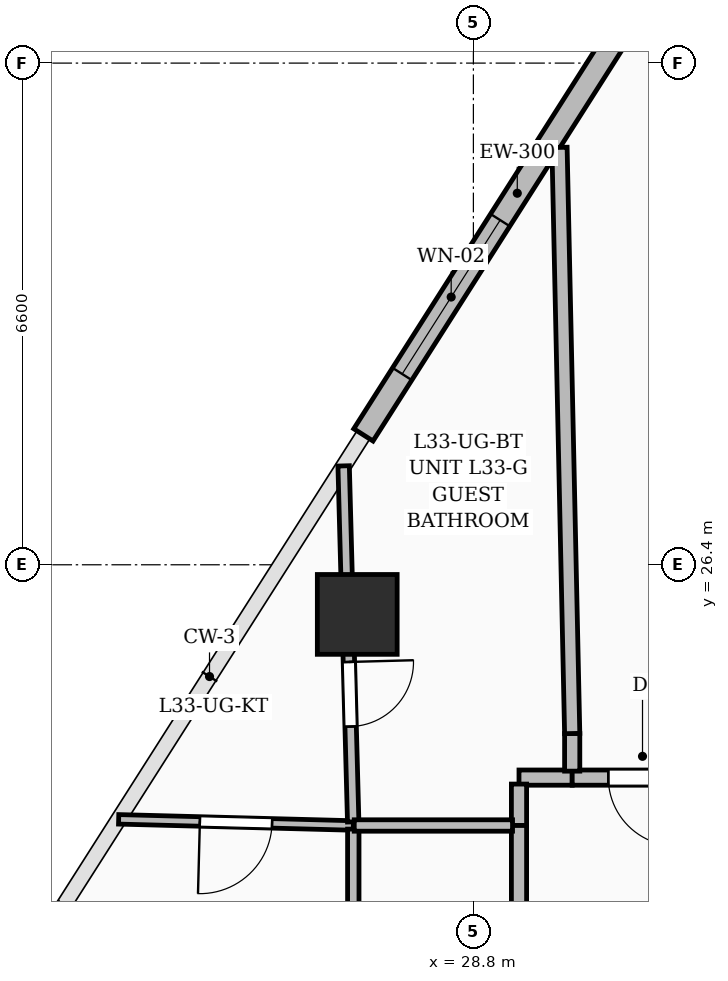
"""IFC4 building model, lengths in metres.
Left out: names, types, materials, properties, quantities, classifications, styles, units other than length and angle.
Written with IfcOpenShell. Run it as: python <this file> out.ifc"""

import sys

from ifc_helpers import new_model, si_unit, direction, frame, frame_2d, origin, origin_2d, place, context, subcontext, project, spatial, rectangle, extrude, element, fill, save


model = new_model("IFC4")
c1 = context("Model", 3, precision=1e-05, world=origin(), true_north=direction((0.0, 1.0)))
c2 = subcontext(c1, "Body", "Model", "MODEL_VIEW")
j1 = project(units=[si_unit("LENGTHUNIT", "METRE"), si_unit("PLANEANGLEUNIT", "RADIAN")], contexts=[c1])
p1 = place(None, origin())
s1 = spatial("IfcSite", under=j1, at=p1, CompositionType="ELEMENT")
p2 = place(p1, origin())
s2 = spatial("IfcBuilding", under=s1, at=p2, CompositionType="ELEMENT")
p3 = place(p2, frame((0.0, 0.0, 132.0)))
s3 = spatial("IfcBuildingStorey", under=s2, at=p3, CompositionType="ELEMENT", Elevation=132.0)
p4 = place(p3, frame((27.272, 25.747, 0.0), z_axis=(0.0, 0.0, 1.0), x_axis=(1.0, 0.0, 0.0)))
e1 = element("IfcColumn", 1, at=p4, inside=s3, PredefinedType="COLUMN", context=c2, shape_type="SweptSolid", body=[
    extrude(rectangle(XDim=1.05, YDim=1.05, at=origin_2d()), origin(), (0.0, 0.0, 1.0), 3.6),
])
p5 = place(p3, frame((27.353, 28.109, 0.0), z_axis=(0.0, 0.0, 1.0), x_axis=(0.537126938509, 0.843501423785, 0.0)))
e2 = element("IfcWall", 2, at=p5, inside=s3, PredefinedType="SOLIDWALL", context=c2, shape_type="SweptSolid", body=[
    extrude(rectangle(XDim=7.538, YDim=0.3, at=frame_2d((3.769, 0.0))), origin(), (0.0, 0.0, 1.0), 3.35),
])
p6 = place(p5, frame((0.95, 0.0, 0.6)))
e3 = element("IfcOpeningElement", 3, at=p6, cuts=e2, PredefinedType="OPENING", context=c2, shape_type="SweptSolid", body=[
    extrude(rectangle(XDim=2.4, YDim=2.1, at=frame_2d((1.2, 1.05))), frame((0.0, 0.16, 0.0), z_axis=(0.0, -1.0, 0.0), x_axis=(1.0, 0.0, 0.0)), (0.0, 0.0, 1.0), 0.32),
])
p7 = place(p3, frame((30.1, 23.6, 0.0), z_axis=(0.0, 0.0, 1.0), x_axis=(-1.0, 0.0, 0.0)))
e4 = element("IfcWall", 4, at=p7, inside=s3, PredefinedType="PARTITIONING", context=c2, shape_type="SweptSolid", body=[
    extrude(rectangle(XDim=0.7, YDim=0.2, at=frame_2d((0.35, 0.0))), origin(), (0.0, 0.0, 1.0), 2.372),
])
p8 = place(p3, frame((29.4, 23.515, 0.0), z_axis=(0.0, 0.0, 1.0), x_axis=(0.0, -1.0, 0.0)))
e5 = element("IfcWall", 5, at=p8, inside=s3, PredefinedType="PARTITIONING", context=c2, shape_type="SweptSolid", body=[
    extrude(rectangle(XDim=0.545, YDim=0.2, at=frame_2d((0.272, 0.0))), origin(), (0.0, 0.0, 1.0), 2.372),
])
p9 = place(p3, frame((29.4, 22.97, 0.0), z_axis=(0.0, 0.0, 1.0), x_axis=(0.0, -1.0, 0.0)))
e6 = element("IfcWall", 6, at=p9, inside=s3, PredefinedType="PARTITIONING", context=c2, shape_type="SweptSolid", body=[
    extrude(rectangle(XDim=5.22, YDim=0.2, at=frame_2d((2.61, 0.0))), origin(), (0.0, 0.0, 1.0), 3.01),
])
p10 = place(p3, frame((31.865, 23.6, 0.0), z_axis=(0.0, 0.0, 1.0), x_axis=(-1.0, 0.0, 0.0)))
e7 = element("IfcWall", 7, at=p10, inside=s3, PredefinedType="PARTITIONING", context=c2, shape_type="SweptSolid", body=[
    extrude(rectangle(XDim=1.765, YDim=0.2, at=frame_2d((0.882, 0.0))), origin(), (0.0, 0.0, 1.0), 3.01),
])
p11 = place(p10, frame((0.39, 0.0, 0.0)))
e8 = element("IfcOpeningElement", 8, at=p11, cuts=e7, PredefinedType="OPENING", context=c2, shape_type="SweptSolid", body=[
    extrude(rectangle(XDim=0.9, YDim=2.1, at=frame_2d((0.45, 1.05))), frame((0.0, 0.11, 0.0), z_axis=(0.0, -1.0, 0.0), x_axis=(1.0, 0.0, 0.0)), (0.0, 0.0, 1.0), 0.22),
])
p12 = place(p3, frame((27.22, 22.97, 0.0), z_axis=(0.0, 0.0, 1.0), x_axis=(-0.999655449648, 0.02624846641, 0.0)))
e9 = element("IfcWall", 9, at=p12, inside=s3, PredefinedType="PARTITIONING", context=c2, shape_type="SweptSolid", body=[
    extrude(rectangle(XDim=3.088, YDim=0.125, at=frame_2d((1.544, 0.0))), origin(), (0.0, 0.0, 1.0), 2.57),
])
p13 = place(p12, frame((1.069, 0.0, 0.0)))
e10 = element("IfcOpeningElement", 10, at=p13, cuts=e9, PredefinedType="OPENING", context=c2, shape_type="SweptSolid", body=[
    extrude(rectangle(XDim=0.95, YDim=2.2, at=frame_2d((0.475, 1.1))), frame((0.0, 0.072, 0.0), z_axis=(0.0, -1.0, 0.0), x_axis=(1.0, 0.0, 0.0)), (0.0, 0.0, 1.0), 0.145),
])
p14 = place(p3, frame((27.22, 17.835, 0.0), z_axis=(0.0, 0.0, 1.0), x_axis=(0.0, 1.0, 0.0)))
e11 = element("IfcWall", 11, at=p14, inside=s3, PredefinedType="PARTITIONING", context=c2, shape_type="SweptSolid", body=[
    extrude(rectangle(XDim=5.088, YDim=0.15, at=frame_2d((2.544, 0.0))), origin(), (0.0, 0.0, 1.0), 3.01),
])
p15 = place(p14, frame((2.075, 0.0, 0.0)))
e12 = element("IfcOpeningElement", 12, at=p15, cuts=e11, PredefinedType="OPENING", context=c2, shape_type="SweptSolid", body=[
    extrude(rectangle(XDim=0.9, YDim=2.15, at=frame_2d((0.45, 1.075))), frame((0.0, 0.085, 0.0), z_axis=(0.0, -1.0, 0.0), x_axis=(1.0, 0.0, 0.0)), (0.0, 0.0, 1.0), 0.17),
])
p16 = place(p3, frame((27.093, 27.701, 0.0), z_axis=(0.0, 0.0, 1.0), x_axis=(0.026837017595, -0.999639822379, 0.0)))
e13 = element("IfcWall", 13, at=p16, inside=s3, PredefinedType="PARTITIONING", context=c2, shape_type="SweptSolid", body=[
    extrude(rectangle(XDim=4.685, YDim=0.15, at=frame_2d((2.343, 0.0))), origin(), (0.0, 0.0, 1.0), 2.57),
])
p17 = place(p16, frame((2.581, 0.0, 0.0)))
e14 = element("IfcOpeningElement", 14, at=p17, cuts=e13, PredefinedType="OPENING", context=c2, shape_type="SweptSolid", body=[
    extrude(rectangle(XDim=0.85, YDim=2.1, at=frame_2d((0.425, 1.05))), frame((0.0, 0.085, 0.0), z_axis=(0.0, -1.0, 0.0), x_axis=(1.0, 0.0, 0.0)), (0.0, 0.0, 1.0), 0.17),
])
p18 = place(p3, frame((27.232, 22.97, 0.0), z_axis=(0.0, 0.0, 1.0), x_axis=(1.0, 0.0, 0.0)))
e15 = element("IfcWall", 15, at=p18, inside=s3, PredefinedType="PARTITIONING", context=c2, shape_type="SweptSolid", body=[
    extrude(rectangle(XDim=2.083, YDim=0.15, at=frame_2d((1.041, 0.0))), origin(), (0.0, 0.0, 1.0), 3.01),
])
p19 = place(p3, frame((30.1, 23.685, 0.0), z_axis=(0.0, 0.0, 1.0), x_axis=(0.0, 1.0, 0.0)))
e16 = element("IfcWall", 16, at=p19, inside=s3, PredefinedType="PARTITIONING", context=c2, shape_type="SweptSolid", body=[
    extrude(rectangle(XDim=0.495, YDim=0.2, at=frame_2d((0.248, 0.0))), origin(), (0.0, 0.0, 1.0), 3.35),
])
p20 = place(p3, frame((30.1, 24.18, 0.0), z_axis=(0.0, 0.0, 1.0), x_axis=(-0.021650773046, 0.99976559454, 0.0)))
e17 = element("IfcWall", 17, at=p20, inside=s3, PredefinedType="PARTITIONING", context=c2, shape_type="SweptSolid", body=[
    extrude(rectangle(XDim=7.713, YDim=0.2, at=frame_2d((3.856, 0.0))), origin(), (0.0, 0.0, 1.0), 2.57),
])
p21 = place(p6, origin())
e18 = element("IfcWindow", 18, at=p21, inside=s3, PartitioningType="SINGLE_PANEL", PredefinedType="WINDOW", context=c2, shape_type="SweptSolid", body=[
    extrude(rectangle(XDim=2.4, YDim=2.1, at=frame_2d((1.2, 1.05))), frame((0.0, 0.03, 0.0), z_axis=(0.0, -1.0, 0.0), x_axis=(1.0, 0.0, 0.0)), (0.0, 0.0, 1.0), 0.06),
])
fill(e3, e18)
p22 = place(p11, origin())
e19 = element("IfcDoor", 19, at=p22, inside=s3, OperationType="SINGLE_SWING_LEFT", PredefinedType="DOOR", context=c2, shape_type="SweptSolid", body=[
    extrude(rectangle(XDim=0.9, YDim=2.1, at=frame_2d((0.45, 1.05))), frame((0.0, 0.025, 0.0), z_axis=(0.0, -1.0, 0.0), x_axis=(1.0, 0.0, 0.0)), (0.0, 0.0, 1.0), 0.05),
])
fill(e8, e19)
p23 = place(p13, origin())
e20 = element("IfcDoor", 20, at=p23, inside=s3, OperationType="SINGLE_SWING_RIGHT", PredefinedType="DOOR", context=c2, shape_type="SweptSolid", body=[
    extrude(rectangle(XDim=0.95, YDim=2.2, at=frame_2d((0.475, 1.1))), frame((0.0, 0.025, 0.0), z_axis=(0.0, -1.0, 0.0), x_axis=(1.0, 0.0, 0.0)), (0.0, 0.0, 1.0), 0.05),
])
fill(e10, e20)
p24 = place(p17, origin())
e21 = element("IfcDoor", 21, at=p24, inside=s3, OperationType="SINGLE_SWING_LEFT", PredefinedType="DOOR", context=c2, shape_type="SweptSolid", body=[
    extrude(rectangle(XDim=0.85, YDim=2.1, at=frame_2d((0.425, 1.05))), frame((0.0, 0.025, 0.0), z_axis=(0.0, -1.0, 0.0), x_axis=(1.0, 0.0, 0.0)), (0.0, 0.0, 1.0), 0.05),
])
fill(e14, e21)
save(model, sys.argv[1])
